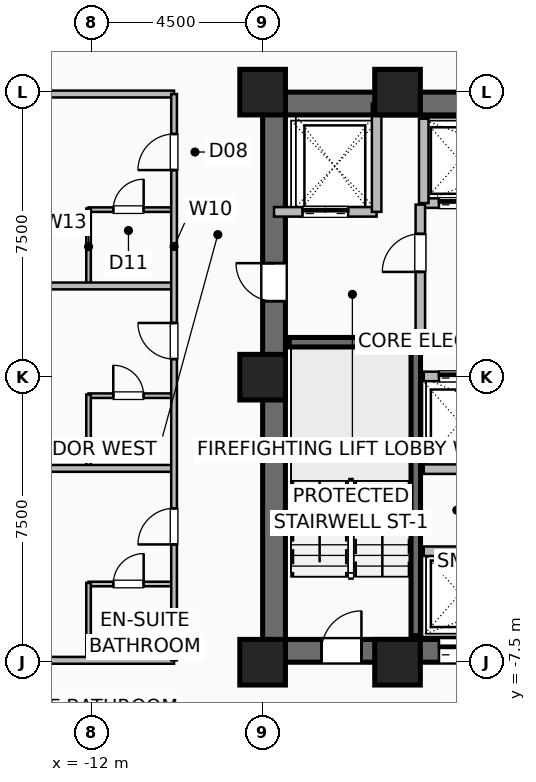
"""IFC4 building model, lengths in metres.
Left out: names, types, materials, properties, quantities, classifications, styles, units other than length and angle.
Written with IfcOpenShell. Run it as: python <this file> out.ifc"""

import sys

from ifc_helpers import new_model, si_unit, direction, frame, frame_2d, origin, origin_2d, place, context, subcontext, project, spatial, rectangle, hollow_rectangle, extrude, element, fill, save


model = new_model("IFC4")
c1 = context("Model", 3, precision=1e-05, world=origin(), true_north=direction((0.0, 1.0)))
c2 = subcontext(c1, "Body", "Model", "MODEL_VIEW")
j1 = project(units=[si_unit("LENGTHUNIT", "METRE"), si_unit("PLANEANGLEUNIT", "RADIAN")], contexts=[c1])
p1 = place(None, origin())
s1 = spatial("IfcSite", under=j1, at=p1, CompositionType="ELEMENT")
p2 = place(p1, origin())
s2 = spatial("IfcBuilding", under=s1, at=p2, CompositionType="ELEMENT")
p3 = place(p2, frame((0.0, 0.0, 27.0)))
s3 = spatial("IfcBuildingStorey", under=s2, at=p3, CompositionType="ELEMENT", Elevation=27.0)
for number, where, z_axis, x_axis in (
    (1, (-7.5, -7.5, 0.0), (0.0, 0.0, 1.0), (1.0, 0.0, 0.0)),
    (2, (-3.95, -7.5, 0.0), (0.0, 0.0, 1.0), (1.0, 0.0, 0.0)),
    (3, (-3.95, 7.5, 0.0), (0.0, 0.0, 1.0), (1.0, 0.0, 0.0)),
    (4, (-7.5, 7.5, 0.0), (0.0, 0.0, 1.0), (1.0, 0.0, 0.0)),
    (5, (-7.5, 0.0, 0.0), (0.0, 0.0, 1.0), (1.0, 0.0, 0.0)),
):
    element("IfcColumn", number, at=place(p3, frame(where, z_axis=z_axis, x_axis=x_axis)), inside=s3, PredefinedType="COLUMN", context=c2, shape_type="SweptSolid", body=[
        extrude(hollow_rectangle(XDim=1.2, YDim=1.2, WallThickness=0.055, at=origin_2d()), origin(), (0.0, 0.0, 1.0), 3.5),
    ])
p4 = place(p3, frame((-7.5, -7.2, 0.0), z_axis=(0.0, 0.0, 1.0), x_axis=(1.0, 0.0, 0.0)))
e6 = element("IfcWall", 6, at=p4, inside=s3, PredefinedType="SHEAR", context=c2, shape_type="SweptSolid", body=[
    extrude(rectangle(XDim=15.0, YDim=0.6, at=frame_2d((7.5, 0.0))), origin(), (0.0, 0.0, 1.0), 3.25),
])
p5 = place(p4, frame((1.55, 0.0, 0.0)))
e7 = element("IfcOpeningElement", 7, at=p5, cuts=e6, PredefinedType="OPENING", context=c2, shape_type="SweptSolid", body=[
    extrude(rectangle(XDim=1.05, YDim=2.08, at=frame_2d((0.525, 1.04))), frame((0.0, 0.31, 0.0), z_axis=(0.0, -1.0, 0.0), x_axis=(1.0, 0.0, 0.0)), (0.0, 0.0, 1.0), 0.62),
])
p6 = place(p4, frame((12.4, 0.0, 0.0)))
e8 = element("IfcOpeningElement", 8, at=p6, cuts=e6, PredefinedType="OPENING", context=c2, shape_type="SweptSolid", body=[
    extrude(rectangle(XDim=1.05, YDim=2.08, at=frame_2d((0.525, 1.04))), frame((0.0, 0.31, 0.0), z_axis=(0.0, -1.0, 0.0), x_axis=(1.0, 0.0, 0.0)), (0.0, 0.0, 1.0), 0.62),
])
p7 = place(p4, frame((4.64, 0.0, 0.0)))
e9 = element("IfcOpeningElement", 9, at=p7, cuts=e6, PredefinedType="OPENING", context=c2, shape_type="SweptSolid", body=[
    extrude(rectangle(XDim=1.1, YDim=2.2, at=frame_2d((0.55, 1.1))), frame((0.0, 0.31, 0.0), z_axis=(0.0, -1.0, 0.0), x_axis=(1.0, 0.0, 0.0)), (0.0, 0.0, 1.0), 0.62),
])
p8 = place(p4, frame((6.52, 0.0, 0.0)))
e10 = element("IfcOpeningElement", 10, at=p8, cuts=e6, PredefinedType="OPENING", context=c2, shape_type="SweptSolid", body=[
    extrude(rectangle(XDim=1.1, YDim=2.2, at=frame_2d((0.55, 1.1))), frame((0.0, 0.31, 0.0), z_axis=(0.0, -1.0, 0.0), x_axis=(1.0, 0.0, 0.0)), (0.0, 0.0, 1.0), 0.62),
])
p9 = place(p4, frame((8.4, 0.0, 0.0)))
e11 = element("IfcOpeningElement", 11, at=p9, cuts=e6, PredefinedType="OPENING", context=c2, shape_type="SweptSolid", body=[
    extrude(rectangle(XDim=1.1, YDim=2.2, at=frame_2d((0.55, 1.1))), frame((0.0, 0.31, 0.0), z_axis=(0.0, -1.0, 0.0), x_axis=(1.0, 0.0, 0.0)), (0.0, 0.0, 1.0), 0.62),
])
p10 = place(p3, frame((-7.5, 7.2, 0.0), z_axis=(0.0, 0.0, 1.0), x_axis=(1.0, 0.0, 0.0)))
e12 = element("IfcWall", 12, at=p10, inside=s3, PredefinedType="SHEAR", context=c2, shape_type="SweptSolid", body=[
    extrude(rectangle(XDim=15.0, YDim=0.6, at=frame_2d((7.5, 0.0))), origin(), (0.0, 0.0, 1.0), 3.25),
])
p11 = place(p3, frame((-7.2, -7.5, 0.0), z_axis=(0.0, 0.0, 1.0), x_axis=(0.0, 1.0, 0.0)))
e13 = element("IfcWall", 13, at=p11, inside=s3, PredefinedType="SHEAR", context=c2, shape_type="SweptSolid", body=[
    extrude(rectangle(XDim=15.0, YDim=0.6, at=frame_2d((7.5, 0.0))), origin(), (0.0, 0.0, 1.0), 3.25),
])
p12 = place(p11, frame((9.5, 0.0, 0.0)))
e14 = element("IfcOpeningElement", 14, at=p12, cuts=e13, PredefinedType="OPENING", context=c2, shape_type="SweptSolid", body=[
    extrude(rectangle(XDim=1.0, YDim=2.08, at=frame_2d((0.5, 1.04))), frame((0.0, 0.31, 0.0), z_axis=(0.0, -1.0, 0.0), x_axis=(1.0, 0.0, 0.0)), (0.0, 0.0, 1.0), 0.62),
])
p13 = place(p3, frame((-3.47, -6.8, 0.0), z_axis=(0.0, 0.0, 1.0), x_axis=(0.0, 1.0, 0.0)))
e15 = element("IfcWall", 15, at=p13, inside=s3, PredefinedType="SHEAR", context=c2, shape_type="SweptSolid", body=[
    extrude(rectangle(XDim=7.72, YDim=0.25, at=frame_2d((3.86, 0.0))), origin(), (0.0, 0.0, 1.0), 3.25),
])
p14 = place(p3, frame((-6.8, 0.92, 0.0), z_axis=(0.0, 0.0, 1.0), x_axis=(1.0, 0.0, 0.0)))
e16 = element("IfcWall", 16, at=p14, inside=s3, PredefinedType="SHEAR", context=c2, shape_type="SweptSolid", body=[
    extrude(rectangle(XDim=3.33, YDim=0.25, at=frame_2d((1.665, 0.0))), origin(), (0.0, 0.0, 1.0), 3.25),
])
p15 = place(p3, frame((-3.26, -4.58, 0.0), z_axis=(0.0, 0.0, 1.0), x_axis=(1.0, 0.0, 0.0)))
e17 = element("IfcWall", 17, at=p15, inside=s3, PredefinedType="SHEAR", context=c2, shape_type="SweptSolid", body=[
    extrude(rectangle(XDim=5.64, YDim=0.25, at=frame_2d((2.82, 0.0))), origin(), (0.0, 0.0, 1.0), 3.25),
])
p16 = place(p3, frame((-3.26, 0.02, 0.0), z_axis=(0.0, 0.0, 1.0), x_axis=(1.0, 0.0, 0.0)))
e18 = element("IfcWall", 18, at=p16, inside=s3, PredefinedType="SHEAR", context=c2, shape_type="SweptSolid", body=[
    extrude(rectangle(XDim=5.64, YDim=0.25, at=frame_2d((2.82, 0.0))), origin(), (0.0, 0.0, 1.0), 3.25),
])
p17 = place(p16, frame((0.4, 0.0, 0.0)))
e19 = element("IfcOpeningElement", 19, at=p17, cuts=e18, PredefinedType="OPENING", context=c2, shape_type="SweptSolid", body=[
    extrude(rectangle(XDim=1.1, YDim=2.2, at=frame_2d((0.55, 1.1))), frame((0.0, 0.135, 0.0), z_axis=(0.0, -1.0, 0.0), x_axis=(1.0, 0.0, 0.0)), (0.0, 0.0, 1.0), 0.27),
])
p18 = place(p16, frame((2.28, 0.0, 0.0)))
e20 = element("IfcOpeningElement", 20, at=p18, cuts=e18, PredefinedType="OPENING", context=c2, shape_type="SweptSolid", body=[
    extrude(rectangle(XDim=1.1, YDim=2.2, at=frame_2d((0.55, 1.1))), frame((0.0, 0.135, 0.0), z_axis=(0.0, -1.0, 0.0), x_axis=(1.0, 0.0, 0.0)), (0.0, 0.0, 1.0), 0.27),
])
p19 = place(p16, frame((4.16, 0.0, 0.0)))
e21 = element("IfcOpeningElement", 21, at=p19, cuts=e18, PredefinedType="OPENING", context=c2, shape_type="SweptSolid", body=[
    extrude(rectangle(XDim=1.1, YDim=2.2, at=frame_2d((0.55, 1.1))), frame((0.0, 0.135, 0.0), z_axis=(0.0, -1.0, 0.0), x_axis=(1.0, 0.0, 0.0)), (0.0, 0.0, 1.0), 0.27),
])
p20 = place(p3, frame((-3.26, -2.42, 0.0), z_axis=(0.0, 0.0, 1.0), x_axis=(1.0, 0.0, 0.0)))
e22 = element("IfcWall", 22, at=p20, inside=s3, PredefinedType="SHEAR", context=c2, shape_type="SweptSolid", body=[
    extrude(rectangle(XDim=5.64, YDim=0.25, at=frame_2d((2.82, 0.0))), origin(), (0.0, 0.0, 1.0), 3.25),
])
p21 = place(p3, frame((-3.26, 4.58, 0.0), z_axis=(0.0, 0.0, 1.0), x_axis=(1.0, 0.0, 0.0)))
e23 = element("IfcWall", 23, at=p21, inside=s3, PredefinedType="SHEAR", context=c2, shape_type="SweptSolid", body=[
    extrude(rectangle(XDim=5.64, YDim=0.25, at=frame_2d((2.82, 0.0))), origin(), (0.0, 0.0, 1.0), 3.25),
])
p22 = place(p21, frame((0.4, 0.0, 0.0)))
e24 = element("IfcOpeningElement", 24, at=p22, cuts=e23, PredefinedType="OPENING", context=c2, shape_type="SweptSolid", body=[
    extrude(rectangle(XDim=1.1, YDim=2.2, at=frame_2d((0.55, 1.1))), frame((0.0, 0.135, 0.0), z_axis=(0.0, -1.0, 0.0), x_axis=(1.0, 0.0, 0.0)), (0.0, 0.0, 1.0), 0.27),
])
p23 = place(p21, frame((2.28, 0.0, 0.0)))
e25 = element("IfcOpeningElement", 25, at=p23, cuts=e23, PredefinedType="OPENING", context=c2, shape_type="SweptSolid", body=[
    extrude(rectangle(XDim=1.1, YDim=2.2, at=frame_2d((0.55, 1.1))), frame((0.0, 0.135, 0.0), z_axis=(0.0, -1.0, 0.0), x_axis=(1.0, 0.0, 0.0)), (0.0, 0.0, 1.0), 0.27),
])
p24 = place(p21, frame((4.16, 0.0, 0.0)))
e26 = element("IfcOpeningElement", 26, at=p24, cuts=e23, PredefinedType="OPENING", context=c2, shape_type="SweptSolid", body=[
    extrude(rectangle(XDim=1.1, YDim=2.2, at=frame_2d((0.55, 1.1))), frame((0.0, 0.135, 0.0), z_axis=(0.0, -1.0, 0.0), x_axis=(1.0, 0.0, 0.0)), (0.0, 0.0, 1.0), 0.27),
])
p25 = place(p3, frame((-3.26, 4.58, 0.0), z_axis=(0.0, 0.0, 1.0), x_axis=(0.0, 1.0, 0.0)))
e27 = element("IfcWall", 27, at=p25, inside=s3, PredefinedType="SHEAR", context=c2, shape_type="SweptSolid", body=[
    extrude(rectangle(XDim=2.22, YDim=0.25, at=frame_2d((1.11, 0.0))), origin(), (0.0, 0.0, 1.0), 3.25),
])
p26 = place(p3, frame((-7.2, 4.35, 0.0), z_axis=(0.0, 0.0, 1.0), x_axis=(1.0, 0.0, 0.0)))
e28 = element("IfcWall", 28, at=p26, inside=s3, PredefinedType="SHEAR", context=c2, shape_type="SweptSolid", body=[
    extrude(rectangle(XDim=2.7, YDim=0.25, at=frame_2d((1.35, 0.0))), origin(), (0.0, 0.0, 1.0), 3.25),
])
p27 = place(p26, frame((0.75, 0.0, 0.0)))
e29 = element("IfcOpeningElement", 29, at=p27, cuts=e28, PredefinedType="OPENING", context=c2, shape_type="SweptSolid", body=[
    extrude(rectangle(XDim=1.2, YDim=2.2, at=frame_2d((0.6, 1.1))), frame((0.0, 0.135, 0.0), z_axis=(0.0, -1.0, 0.0), x_axis=(1.0, 0.0, 0.0)), (0.0, 0.0, 1.0), 0.27),
])
p28 = place(p3, frame((-4.5, 4.35, 0.0), z_axis=(0.0, 0.0, 1.0), x_axis=(0.0, 1.0, 0.0)))
e30 = element("IfcWall", 30, at=p28, inside=s3, PredefinedType="SHEAR", context=c2, shape_type="SweptSolid", body=[
    extrude(rectangle(XDim=2.85, YDim=0.25, at=frame_2d((1.425, 0.0))), origin(), (0.0, 0.0, 1.0), 3.25),
])
p29 = place(p3, frame((-3.35, 0.92, 0.0), z_axis=(0.0, 0.0, 1.0), x_axis=(0.0, 1.0, 0.0)))
e31 = element("IfcWall", 31, at=p29, inside=s3, PredefinedType="SHEAR", context=c2, shape_type="SweptSolid", body=[
    extrude(rectangle(XDim=3.62, YDim=0.25, at=frame_2d((1.81, 0.0))), origin(), (0.0, 0.0, 1.0), 3.25),
])
p30 = place(p29, frame((1.85, 0.0, 0.0)))
e32 = element("IfcOpeningElement", 32, at=p30, cuts=e31, PredefinedType="OPENING", context=c2, shape_type="SweptSolid", body=[
    extrude(rectangle(XDim=1.0, YDim=2.08, at=frame_2d((0.5, 1.04))), frame((0.0, 0.135, 0.0), z_axis=(0.0, -1.0, 0.0), x_axis=(1.0, 0.0, 0.0)), (0.0, 0.0, 1.0), 0.27),
])
p31 = place(p3, frame((-12.08, -5.442, 0.0), z_axis=(0.0, 0.0, 1.0), x_axis=(1.0, 0.0, 0.0)))
e33 = element("IfcWall", 33, at=p31, inside=s3, PredefinedType="PLUMBINGWALL", context=c2, shape_type="SweptSolid", body=[
    extrude(rectangle(XDim=2.25, YDim=0.12, at=frame_2d((1.125, 0.0))), origin(), (0.0, 0.0, 1.0), 3.25),
])
p32 = place(p31, frame((0.65, 0.0, 0.0)))
e34 = element("IfcOpeningElement", 34, at=p32, cuts=e33, PredefinedType="OPENING", context=c2, shape_type="SweptSolid", body=[
    extrude(rectangle(XDim=0.8, YDim=2.05, at=frame_2d((0.4, 1.025))), frame((0.0, 0.07, 0.0), z_axis=(0.0, -1.0, 0.0), x_axis=(1.0, 0.0, 0.0)), (0.0, 0.0, 1.0), 0.14),
])
p33 = place(p3, frame((-12.08, -7.42, 0.0), z_axis=(0.0, 0.0, 1.0), x_axis=(0.0, 1.0, 0.0)))
e35 = element("IfcWall", 35, at=p33, inside=s3, PredefinedType="PLUMBINGWALL", context=c2, shape_type="SweptSolid", body=[
    extrude(rectangle(XDim=2.008, YDim=0.12, at=frame_2d((1.004, 0.0))), origin(), (0.0, 0.0, 1.0), 3.25),
])
p34 = place(p3, frame((-12.08, -0.487, 0.0), z_axis=(0.0, 0.0, 1.0), x_axis=(1.0, 0.0, 0.0)))
e36 = element("IfcWall", 36, at=p34, inside=s3, PredefinedType="PLUMBINGWALL", context=c2, shape_type="SweptSolid", body=[
    extrude(rectangle(XDim=2.25, YDim=0.12, at=frame_2d((1.125, 0.0))), origin(), (0.0, 0.0, 1.0), 3.25),
])
p35 = place(p34, frame((0.65, 0.0, 0.0)))
e37 = element("IfcOpeningElement", 37, at=p35, cuts=e36, PredefinedType="OPENING", context=c2, shape_type="SweptSolid", body=[
    extrude(rectangle(XDim=0.8, YDim=2.05, at=frame_2d((0.4, 1.025))), frame((0.0, 0.07, 0.0), z_axis=(0.0, -1.0, 0.0), x_axis=(1.0, 0.0, 0.0)), (0.0, 0.0, 1.0), 0.14),
])
p36 = place(p3, frame((-12.08, -2.37, 0.0), z_axis=(0.0, 0.0, 1.0), x_axis=(0.0, 1.0, 0.0)))
e38 = element("IfcWall", 38, at=p36, inside=s3, PredefinedType="PLUMBINGWALL", context=c2, shape_type="SweptSolid", body=[
    extrude(rectangle(XDim=1.913, YDim=0.12, at=frame_2d((0.957, 0.0))), origin(), (0.0, 0.0, 1.0), 3.25),
])
p37 = place(p3, frame((-12.08, 4.408, 0.0), z_axis=(0.0, 0.0, 1.0), x_axis=(1.0, 0.0, 0.0)))
e39 = element("IfcWall", 39, at=p37, inside=s3, PredefinedType="PLUMBINGWALL", context=c2, shape_type="SweptSolid", body=[
    extrude(rectangle(XDim=2.25, YDim=0.12, at=frame_2d((1.125, 0.0))), origin(), (0.0, 0.0, 1.0), 3.25),
])
p38 = place(p37, frame((0.65, 0.0, 0.0)))
e40 = element("IfcOpeningElement", 40, at=p38, cuts=e39, PredefinedType="OPENING", context=c2, shape_type="SweptSolid", body=[
    extrude(rectangle(XDim=0.8, YDim=2.05, at=frame_2d((0.4, 1.025))), frame((0.0, 0.07, 0.0), z_axis=(0.0, -1.0, 0.0), x_axis=(1.0, 0.0, 0.0)), (0.0, 0.0, 1.0), 0.14),
])
p39 = place(p3, frame((-12.08, 2.43, 0.0), z_axis=(0.0, 0.0, 1.0), x_axis=(0.0, 1.0, 0.0)))
e41 = element("IfcWall", 41, at=p39, inside=s3, PredefinedType="PLUMBINGWALL", context=c2, shape_type="SweptSolid", body=[
    extrude(rectangle(XDim=2.008, YDim=0.12, at=frame_2d((1.004, 0.0))), origin(), (0.0, 0.0, 1.0), 3.25),
])
for number, where, z_axis, x_axis in (
    (42, (-23.82, -7.45, 0.0), (0.0, 0.0, 1.0), (1.0, 0.0, 0.0)),
    (43, (-23.82, -2.4, 0.0), (0.0, 0.0, 1.0), (1.0, 0.0, 0.0)),
    (44, (-23.82, 2.4, 0.0), (0.0, 0.0, 1.0), (1.0, 0.0, 0.0)),
    (45, (-23.82, 7.45, 0.0), (0.0, 0.0, 1.0), (1.0, 0.0, 0.0)),
):
    element("IfcWall", number, at=place(p3, frame(where, z_axis=z_axis, x_axis=x_axis)), inside=s3, PredefinedType="PARTITIONING", context=c2, shape_type="SweptSolid", body=[
        extrude(rectangle(XDim=13.99, YDim=0.18, at=frame_2d((6.995, 0.0))), origin(), (0.0, 0.0, 1.0), 3.25),
    ])
p40 = place(p3, frame((-9.83, -7.45, 0.0), z_axis=(0.0, 0.0, 1.0), x_axis=(0.0, 1.0, 0.0)))
e46 = element("IfcWall", 46, at=p40, inside=s3, PredefinedType="PARTITIONING", context=c2, shape_type="SweptSolid", body=[
    extrude(rectangle(XDim=14.9, YDim=0.15, at=frame_2d((7.45, 0.0))), origin(), (0.0, 0.0, 1.0), 3.25),
])
p41 = place(p40, frame((3.049, 0.0, 0.0)))
e47 = element("IfcOpeningElement", 47, at=p41, cuts=e46, PredefinedType="OPENING", context=c2, shape_type="SweptSolid", body=[
    extrude(rectangle(XDim=0.95, YDim=2.08, at=frame_2d((0.475, 1.04))), frame((0.0, 0.085, 0.0), z_axis=(0.0, -1.0, 0.0), x_axis=(1.0, 0.0, 0.0)), (0.0, 0.0, 1.0), 0.17),
])
p42 = place(p40, frame((7.927, 0.0, 0.0)))
e48 = element("IfcOpeningElement", 48, at=p42, cuts=e46, PredefinedType="OPENING", context=c2, shape_type="SweptSolid", body=[
    extrude(rectangle(XDim=0.95, YDim=2.08, at=frame_2d((0.475, 1.04))), frame((0.0, 0.085, 0.0), z_axis=(0.0, -1.0, 0.0), x_axis=(1.0, 0.0, 0.0)), (0.0, 0.0, 1.0), 0.17),
])
p43 = place(p40, frame((12.899, 0.0, 0.0)))
e49 = element("IfcOpeningElement", 49, at=p43, cuts=e46, PredefinedType="OPENING", context=c2, shape_type="SweptSolid", body=[
    extrude(rectangle(XDim=0.95, YDim=2.08, at=frame_2d((0.475, 1.04))), frame((0.0, 0.085, 0.0), z_axis=(0.0, -1.0, 0.0), x_axis=(1.0, 0.0, 0.0)), (0.0, 0.0, 1.0), 0.17),
])
p44 = place(p5, origin())
e50 = element("IfcDoor", 50, at=p44, inside=s3, OperationType="SINGLE_SWING_RIGHT", PredefinedType="DOOR", context=c2, shape_type="SweptSolid", body=[
    extrude(rectangle(XDim=1.05, YDim=2.08, at=frame_2d((0.525, 1.04))), frame((0.0, 0.025, 0.0), z_axis=(0.0, -1.0, 0.0), x_axis=(1.0, 0.0, 0.0)), (0.0, 0.0, 1.0), 0.05),
])
fill(e7, e50)
p45 = place(p12, origin())
e51 = element("IfcDoor", 51, at=p45, inside=s3, OperationType="SINGLE_SWING_RIGHT", PredefinedType="DOOR", context=c2, shape_type="SweptSolid", body=[
    extrude(rectangle(XDim=1.0, YDim=2.08, at=frame_2d((0.5, 1.04))), frame((0.0, 0.025, 0.0), z_axis=(0.0, -1.0, 0.0), x_axis=(1.0, 0.0, 0.0)), (0.0, 0.0, 1.0), 0.05),
])
fill(e14, e51)
p46 = place(p7, origin())
e52 = element("IfcDoor", 52, at=p46, inside=s3, OperationType="DOUBLE_DOOR_SLIDING", PredefinedType="DOOR", context=c2, shape_type="SweptSolid", body=[
    extrude(rectangle(XDim=1.1, YDim=2.2, at=frame_2d((0.55, 1.1))), frame((0.0, 0.025, 0.0), z_axis=(0.0, -1.0, 0.0), x_axis=(1.0, 0.0, 0.0)), (0.0, 0.0, 1.0), 0.05),
])
fill(e9, e52)
p47 = place(p17, origin())
e53 = element("IfcDoor", 53, at=p47, inside=s3, OperationType="DOUBLE_DOOR_SLIDING", PredefinedType="DOOR", context=c2, shape_type="SweptSolid", body=[
    extrude(rectangle(XDim=1.1, YDim=2.2, at=frame_2d((0.55, 1.1))), frame((0.0, 0.025, 0.0), z_axis=(0.0, -1.0, 0.0), x_axis=(1.0, 0.0, 0.0)), (0.0, 0.0, 1.0), 0.05),
])
fill(e19, e53)
p48 = place(p22, origin())
e54 = element("IfcDoor", 54, at=p48, inside=s3, OperationType="DOUBLE_DOOR_SLIDING", PredefinedType="DOOR", context=c2, shape_type="SweptSolid", body=[
    extrude(rectangle(XDim=1.1, YDim=2.2, at=frame_2d((0.55, 1.1))), frame((0.0, 0.025, 0.0), z_axis=(0.0, -1.0, 0.0), x_axis=(1.0, 0.0, 0.0)), (0.0, 0.0, 1.0), 0.05),
])
fill(e24, e54)
p49 = place(p27, origin())
e55 = element("IfcDoor", 55, at=p49, inside=s3, OperationType="DOUBLE_DOOR_SLIDING", PredefinedType="DOOR", context=c2, shape_type="SweptSolid", body=[
    extrude(rectangle(XDim=1.2, YDim=2.2, at=frame_2d((0.6, 1.1))), frame((0.0, 0.025, 0.0), z_axis=(0.0, -1.0, 0.0), x_axis=(1.0, 0.0, 0.0)), (0.0, 0.0, 1.0), 0.05),
])
fill(e29, e55)
p50 = place(p30, origin())
e56 = element("IfcDoor", 56, at=p50, inside=s3, OperationType="SINGLE_SWING_LEFT", PredefinedType="DOOR", context=c2, shape_type="SweptSolid", body=[
    extrude(rectangle(XDim=1.0, YDim=2.08, at=frame_2d((0.5, 1.04))), frame((0.0, 0.025, 0.0), z_axis=(0.0, -1.0, 0.0), x_axis=(1.0, 0.0, 0.0)), (0.0, 0.0, 1.0), 0.05),
])
fill(e32, e56)
p51 = place(p32, origin())
e57 = element("IfcDoor", 57, at=p51, inside=s3, OperationType="SINGLE_SWING_RIGHT", PredefinedType="DOOR", context=c2, shape_type="SweptSolid", body=[
    extrude(rectangle(XDim=0.8, YDim=2.05, at=frame_2d((0.4, 1.025))), frame((0.0, 0.025, 0.0), z_axis=(0.0, -1.0, 0.0), x_axis=(1.0, 0.0, 0.0)), (0.0, 0.0, 1.0), 0.05),
])
fill(e34, e57)
p52 = place(p35, origin())
e58 = element("IfcDoor", 58, at=p52, inside=s3, OperationType="SINGLE_SWING_LEFT", PredefinedType="DOOR", context=c2, shape_type="SweptSolid", body=[
    extrude(rectangle(XDim=0.8, YDim=2.05, at=frame_2d((0.4, 1.025))), frame((0.0, 0.025, 0.0), z_axis=(0.0, -1.0, 0.0), x_axis=(1.0, 0.0, 0.0)), (0.0, 0.0, 1.0), 0.05),
])
fill(e37, e58)
p53 = place(p38, origin())
e59 = element("IfcDoor", 59, at=p53, inside=s3, OperationType="SINGLE_SWING_RIGHT", PredefinedType="DOOR", context=c2, shape_type="SweptSolid", body=[
    extrude(rectangle(XDim=0.8, YDim=2.05, at=frame_2d((0.4, 1.025))), frame((0.0, 0.025, 0.0), z_axis=(0.0, -1.0, 0.0), x_axis=(1.0, 0.0, 0.0)), (0.0, 0.0, 1.0), 0.05),
])
fill(e40, e59)
p54 = place(p41, origin())
e60 = element("IfcDoor", 60, at=p54, inside=s3, OperationType="SINGLE_SWING_LEFT", PredefinedType="DOOR", context=c2, shape_type="SweptSolid", body=[
    extrude(rectangle(XDim=0.95, YDim=2.08, at=frame_2d((0.475, 1.04))), frame((0.0, 0.025, 0.0), z_axis=(0.0, -1.0, 0.0), x_axis=(1.0, 0.0, 0.0)), (0.0, 0.0, 1.0), 0.05),
])
fill(e47, e60)
p55 = place(p42, origin())
e61 = element("IfcDoor", 61, at=p55, inside=s3, OperationType="SINGLE_SWING_RIGHT", PredefinedType="DOOR", context=c2, shape_type="SweptSolid", body=[
    extrude(rectangle(XDim=0.95, YDim=2.08, at=frame_2d((0.475, 1.04))), frame((0.0, 0.025, 0.0), z_axis=(0.0, -1.0, 0.0), x_axis=(1.0, 0.0, 0.0)), (0.0, 0.0, 1.0), 0.05),
])
fill(e48, e61)
p56 = place(p43, origin())
e62 = element("IfcDoor", 62, at=p56, inside=s3, OperationType="SINGLE_SWING_LEFT", PredefinedType="DOOR", context=c2, shape_type="SweptSolid", body=[
    extrude(rectangle(XDim=0.95, YDim=2.08, at=frame_2d((0.475, 1.04))), frame((0.0, 0.025, 0.0), z_axis=(0.0, -1.0, 0.0), x_axis=(1.0, 0.0, 0.0)), (0.0, 0.0, 1.0), 0.05),
])
fill(e49, e62)
save(model, sys.argv[1])
